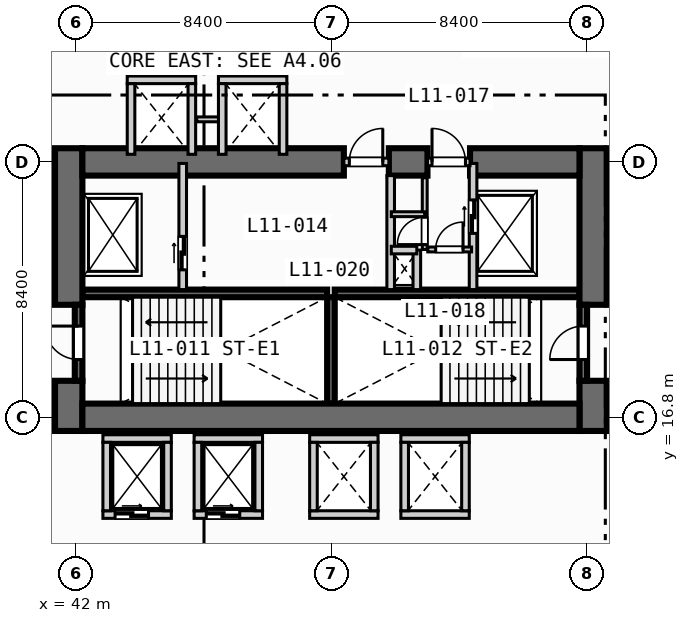
"""IFC4 building model, lengths in metres.
Left out: names, types, materials, properties, quantities, classifications, styles, units other than length and angle.
Written with IfcOpenShell. Run it as: python <this file> out.ifc"""

import sys

from ifc_helpers import new_model, si_unit, direction, frame, frame_2d, origin, place, context, subcontext, project, spatial, rectangle, extrude, element, fill, save


model = new_model("IFC4")
c1 = context("Model", 3, precision=1e-05, world=origin(), true_north=direction((0.0, 1.0)))
c2 = subcontext(c1, "Body", "Model", "MODEL_VIEW")
j1 = project(units=[si_unit("LENGTHUNIT", "METRE"), si_unit("PLANEANGLEUNIT", "RADIAN")], contexts=[c1])
p1 = place(None, origin())
s1 = spatial("IfcSite", under=j1, at=p1, CompositionType="ELEMENT")
p2 = place(p1, origin())
s2 = spatial("IfcBuilding", under=s1, at=p2, CompositionType="ELEMENT")
p3 = place(p2, frame((0.0, 0.0, 51.0)))
s3 = spatial("IfcBuildingStorey", under=s2, at=p3, CompositionType="ELEMENT", Elevation=51.0)
for number, where, z_axis, x_axis in (
    (1, (42.2, 20.875, 0.0), (0.0, 0.0, 1.0), (1.0, 0.0, 0.0)),
    (2, (50.5, 20.875, 0.0), (0.0, 0.0, 1.0), (1.0, 0.0, 0.0)),
):
    element("IfcWall", number, at=place(p3, frame(where, z_axis=z_axis, x_axis=x_axis)), inside=s3, PredefinedType="SOLIDWALL", context=c2, shape_type="SweptSolid", body=[
        extrude(rectangle(XDim=8.05, YDim=0.25, at=frame_2d((4.025, 0.0))), origin(), (0.0, 0.0, 1.0), 3.55),
    ])
p4 = place(p3, frame((50.375, 17.25, 0.0), z_axis=(0.0, 0.0, 1.0), x_axis=(0.0, 1.0, 0.0)))
e3 = element("IfcWall", 3, at=p4, inside=s3, PredefinedType="SOLIDWALL", context=c2, shape_type="SweptSolid", body=[
    extrude(rectangle(XDim=3.5, YDim=0.25, at=frame_2d((1.75, 0.0))), origin(), (0.0, 0.0, 1.0), 3.55),
])
p5 = place(p3, frame((41.75, 16.35, 0.0), z_axis=(0.0, 0.0, 1.0), x_axis=(0.0, 1.0, 0.0)))
e4 = element("IfcWall", 4, at=p5, inside=s3, PredefinedType="SHEAR", context=c2, shape_type="SweptSolid", body=[
    extrude(rectangle(XDim=1.65, YDim=0.9, at=frame_2d((0.825, 0.0))), origin(), (0.0, 0.0, 1.0), 3.55),
])
p6 = place(p3, frame((41.75, 20.5, 0.0), z_axis=(0.0, 0.0, 1.0), x_axis=(0.0, 1.0, 0.0)))
e5 = element("IfcWall", 5, at=p6, inside=s3, PredefinedType="SHEAR", context=c2, shape_type="SweptSolid", body=[
    extrude(rectangle(XDim=5.15, YDim=0.9, at=frame_2d((2.575, 0.0))), origin(), (0.0, 0.0, 1.0), 3.55),
])
p7 = place(p3, frame((59.0, 16.35, 0.0), z_axis=(0.0, 0.0, 1.0), x_axis=(0.0, 1.0, 0.0)))
e6 = element("IfcWall", 6, at=p7, inside=s3, PredefinedType="SHEAR", context=c2, shape_type="SweptSolid", body=[
    extrude(rectangle(XDim=1.65, YDim=0.9, at=frame_2d((0.825, 0.0))), origin(), (0.0, 0.0, 1.0), 3.55),
])
p8 = place(p3, frame((59.0, 20.5, 0.0), z_axis=(0.0, 0.0, 1.0), x_axis=(0.0, 1.0, 0.0)))
e7 = element("IfcWall", 7, at=p8, inside=s3, PredefinedType="SHEAR", context=c2, shape_type="SweptSolid", body=[
    extrude(rectangle(XDim=5.15, YDim=0.9, at=frame_2d((2.575, 0.0))), origin(), (0.0, 0.0, 1.0), 3.55),
])
p9 = place(p3, frame((42.2, 16.8, 0.0), z_axis=(0.0, 0.0, 1.0), x_axis=(1.0, 0.0, 0.0)))
e8 = element("IfcWall", 8, at=p9, inside=s3, PredefinedType="SHEAR", context=c2, shape_type="SweptSolid", body=[
    extrude(rectangle(XDim=16.35, YDim=0.9, at=frame_2d((8.175, 0.0))), origin(), (0.0, 0.0, 1.0), 3.55),
])
p10 = place(p3, frame((42.2, 25.2, 0.0), z_axis=(0.0, 0.0, 1.0), x_axis=(1.0, 0.0, 0.0)))
e9 = element("IfcWall", 9, at=p10, inside=s3, PredefinedType="SHEAR", context=c2, shape_type="SweptSolid", body=[
    extrude(rectangle(XDim=8.6, YDim=0.9, at=frame_2d((4.3, 0.0))), origin(), (0.0, 0.0, 1.0), 3.55),
])
p11 = place(p3, frame((52.28, 25.2, 0.0), z_axis=(0.0, 0.0, 1.0), x_axis=(1.0, 0.0, 0.0)))
e10 = element("IfcWall", 10, at=p11, inside=s3, PredefinedType="SHEAR", context=c2, shape_type="SweptSolid", body=[
    extrude(rectangle(XDim=1.27, YDim=0.9, at=frame_2d((0.635, 0.0))), origin(), (0.0, 0.0, 1.0), 3.55),
])
p12 = place(p3, frame((54.95, 25.2, 0.0), z_axis=(0.0, 0.0, 1.0), x_axis=(1.0, 0.0, 0.0)))
e11 = element("IfcWall", 11, at=p12, inside=s3, PredefinedType="SHEAR", context=c2, shape_type="SweptSolid", body=[
    extrude(rectangle(XDim=3.6, YDim=0.9, at=frame_2d((1.8, 0.0))), origin(), (0.0, 0.0, 1.0), 3.55),
])
p13 = place(p3, frame((42.075, 18.0, 0.0), z_axis=(0.0, 0.0, 1.0), x_axis=(0.0, 1.0, 0.0)))
e12 = element("IfcWall", 12, at=p13, inside=s3, PredefinedType="SOLIDWALL", context=c2, shape_type="SweptSolid", body=[
    extrude(rectangle(XDim=2.5, YDim=0.25, at=frame_2d((1.25, 0.0))), origin(), (0.0, 0.0, 1.0), 3.55),
])
p14 = place(p13, frame((0.7, 0.0, 0.0)))
e13 = element("IfcOpeningElement", 13, at=p14, cuts=e12, PredefinedType="OPENING", context=c2, shape_type="SweptSolid", body=[
    extrude(rectangle(XDim=1.1, YDim=2.15, at=frame_2d((0.55, 1.075))), frame((0.0, 0.135, 0.0), z_axis=(0.0, -1.0, 0.0), x_axis=(1.0, 0.0, 0.0)), (0.0, 0.0, 1.0), 0.27),
])
p15 = place(p3, frame((58.675, 18.0, 0.0), z_axis=(0.0, 0.0, 1.0), x_axis=(0.0, 1.0, 0.0)))
e14 = element("IfcWall", 14, at=p15, inside=s3, PredefinedType="SOLIDWALL", context=c2, shape_type="SweptSolid", body=[
    extrude(rectangle(XDim=2.5, YDim=0.25, at=frame_2d((1.25, 0.0))), origin(), (0.0, 0.0, 1.0), 3.55),
])
p16 = place(p15, frame((0.7, 0.0, 0.0)))
e15 = element("IfcOpeningElement", 15, at=p16, cuts=e14, PredefinedType="OPENING", context=c2, shape_type="SweptSolid", body=[
    extrude(rectangle(XDim=1.1, YDim=2.15, at=frame_2d((0.55, 1.075))), frame((0.0, 0.135, 0.0), z_axis=(0.0, -1.0, 0.0), x_axis=(1.0, 0.0, 0.0)), (0.0, 0.0, 1.0), 0.27),
])
p17 = place(p3, frame((45.5, 21.0, 0.0), z_axis=(0.0, 0.0, 1.0), x_axis=(0.0, 1.0, 0.0)))
e16 = element("IfcWall", 16, at=p17, inside=s3, PredefinedType="SOLIDWALL", context=c2, shape_type="SweptSolid", body=[
    extrude(rectangle(XDim=4.15, YDim=0.25, at=frame_2d((2.075, 0.0))), origin(), (0.0, 0.0, 1.0), 3.55),
])
p18 = place(p17, frame((0.65, 0.0, 0.0)))
e17 = element("IfcOpeningElement", 17, at=p18, cuts=e16, PredefinedType="OPENING", context=c2, shape_type="SweptSolid", body=[
    extrude(rectangle(XDim=1.1, YDim=2.15, at=frame_2d((0.55, 1.075))), frame((0.0, 0.135, 0.0), z_axis=(0.0, -1.0, 0.0), x_axis=(1.0, 0.0, 0.0)), (0.0, 0.0, 1.0), 0.27),
])
p19 = place(p3, frame((50.8, 25.2, 0.0), z_axis=(0.0, 0.0, 1.0), x_axis=(1.0, 0.0, 0.0)))
e18 = element("IfcWall", 18, at=p19, inside=s3, PredefinedType="SOLIDWALL", context=c2, shape_type="SweptSolid", body=[
    extrude(rectangle(XDim=1.48, YDim=0.25, at=frame_2d((0.74, 0.0))), origin(), (0.0, 0.0, 1.0), 3.55),
])
p20 = place(p19, frame((0.18, 0.0, 0.0)))
e19 = element("IfcOpeningElement", 19, at=p20, cuts=e18, PredefinedType="OPENING", context=c2, shape_type="SweptSolid", body=[
    extrude(rectangle(XDim=1.1, YDim=2.15, at=frame_2d((0.55, 1.075))), frame((0.0, 0.135, 0.0), z_axis=(0.0, -1.0, 0.0), x_axis=(1.0, 0.0, 0.0)), (0.0, 0.0, 1.0), 0.27),
])
p21 = place(p3, frame((52.34, 21.0, 0.0), z_axis=(0.0, 0.0, 1.0), x_axis=(0.0, 1.0, 0.0)))
e20 = element("IfcWall", 20, at=p21, inside=s3, PredefinedType="SOLIDWALL", context=c2, shape_type="SweptSolid", body=[
    extrude(rectangle(XDim=3.75, YDim=0.25, at=frame_2d((1.875, 0.0))), origin(), (0.0, 0.0, 1.0), 3.55),
])
p22 = place(p3, frame((55.05, 21.0, 0.0), z_axis=(0.0, 0.0, 1.0), x_axis=(0.0, 1.0, 0.0)))
e21 = element("IfcWall", 21, at=p22, inside=s3, PredefinedType="SOLIDWALL", context=c2, shape_type="SweptSolid", body=[
    extrude(rectangle(XDim=4.15, YDim=0.25, at=frame_2d((2.075, 0.0))), origin(), (0.0, 0.0, 1.0), 3.55),
])
p23 = place(p22, frame((1.85, 0.0, 0.0)))
e22 = element("IfcOpeningElement", 22, at=p23, cuts=e21, PredefinedType="OPENING", context=c2, shape_type="SweptSolid", body=[
    extrude(rectangle(XDim=1.1, YDim=2.15, at=frame_2d((0.55, 1.075))), frame((0.0, 0.135, 0.0), z_axis=(0.0, -1.0, 0.0), x_axis=(1.0, 0.0, 0.0)), (0.0, 0.0, 1.0), 0.27),
])
p24 = place(p3, frame((53.55, 25.2, 0.0), z_axis=(0.0, 0.0, 1.0), x_axis=(1.0, 0.0, 0.0)))
e23 = element("IfcWall", 23, at=p24, inside=s3, PredefinedType="SOLIDWALL", context=c2, shape_type="SweptSolid", body=[
    extrude(rectangle(XDim=1.4, YDim=0.25, at=frame_2d((0.7, 0.0))), origin(), (0.0, 0.0, 1.0), 3.55),
])
p25 = place(p24, frame((0.15, 0.0, 0.0)))
e24 = element("IfcOpeningElement", 24, at=p25, cuts=e23, PredefinedType="OPENING", context=c2, shape_type="SweptSolid", body=[
    extrude(rectangle(XDim=1.1, YDim=2.15, at=frame_2d((0.55, 1.075))), frame((0.0, 0.135, 0.0), z_axis=(0.0, -1.0, 0.0), x_axis=(1.0, 0.0, 0.0)), (0.0, 0.0, 1.0), 0.27),
])
p26 = place(p3, frame((53.2, 21.0, 0.0), z_axis=(0.0, 0.0, 1.0), x_axis=(0.0, 1.0, 0.0)))
e25 = element("IfcWall", 25, at=p26, inside=s3, PredefinedType="SOLIDWALL", context=c2, shape_type="SweptSolid", body=[
    extrude(rectangle(XDim=1.3, YDim=0.25, at=frame_2d((0.65, 0.0))), origin(), (0.0, 0.0, 1.0), 3.55),
])
p27 = place(p3, frame((52.36, 22.3, 0.0), z_axis=(0.0, 0.0, 1.0), x_axis=(1.0, 0.0, 0.0)))
e26 = element("IfcWall", 26, at=p27, inside=s3, PredefinedType="SOLIDWALL", context=c2, shape_type="SweptSolid", body=[
    extrude(rectangle(XDim=0.84, YDim=0.25, at=frame_2d((0.42, 0.0))), origin(), (0.0, 0.0, 1.0), 3.55),
])
p28 = place(p3, frame((53.56, 22.32, 0.0), z_axis=(0.0, 0.0, 1.0), x_axis=(1.0, 0.0, 0.0)))
e27 = element("IfcWall", 27, at=p28, inside=s3, PredefinedType="PARTITIONING", context=c2, shape_type="SweptSolid", body=[
    extrude(rectangle(XDim=1.44, YDim=0.16, at=frame_2d((0.72, 0.0))), origin(), (0.0, 0.0, 1.0), 3.55),
])
p29 = place(p28, frame((0.26, 0.0, 0.0)))
e28 = element("IfcOpeningElement", 28, at=p29, cuts=e27, PredefinedType="OPENING", context=c2, shape_type="SweptSolid", body=[
    extrude(rectangle(XDim=0.9, YDim=2.1, at=frame_2d((0.45, 1.05))), frame((0.0, 0.09, 0.0), z_axis=(0.0, -1.0, 0.0), x_axis=(1.0, 0.0, 0.0)), (0.0, 0.0, 1.0), 0.18),
])
p30 = place(p3, frame((53.46, 22.32, 0.0), z_axis=(0.0, 0.0, 1.0), x_axis=(0.0, 1.0, 0.0)))
e29 = element("IfcWall", 29, at=p30, inside=s3, PredefinedType="PARTITIONING", context=c2, shape_type="SweptSolid", body=[
    extrude(rectangle(XDim=2.36, YDim=0.16, at=frame_2d((1.18, 0.0))), origin(), (0.0, 0.0, 1.0), 3.55),
])
p31 = place(p30, frame((0.16, 0.0, 0.0)))
e30 = element("IfcOpeningElement", 30, at=p31, cuts=e29, PredefinedType="OPENING", context=c2, shape_type="SweptSolid", body=[
    extrude(rectangle(XDim=0.9, YDim=2.1, at=frame_2d((0.45, 1.05))), frame((0.0, 0.09, 0.0), z_axis=(0.0, -1.0, 0.0), x_axis=(1.0, 0.0, 0.0)), (0.0, 0.0, 1.0), 0.18),
])
p32 = place(p3, frame((52.36, 23.48, 0.0), z_axis=(0.0, 0.0, 1.0), x_axis=(1.0, 0.0, 0.0)))
e31 = element("IfcWall", 31, at=p32, inside=s3, PredefinedType="PARTITIONING", context=c2, shape_type="SweptSolid", body=[
    extrude(rectangle(XDim=1.1, YDim=0.16, at=frame_2d((0.55, 0.0))), origin(), (0.0, 0.0, 1.0), 3.55),
])
p33 = place(p3, frame((42.875, 13.6, 0.0), z_axis=(0.0, 0.0, 1.0), x_axis=(1.0, 0.0, 0.0)))
e32 = element("IfcWall", 32, at=p33, inside=s3, PredefinedType="SOLIDWALL", context=c2, shape_type="SweptSolid", body=[
    extrude(rectangle(XDim=2.25, YDim=0.25, at=frame_2d((1.125, 0.0))), origin(), (0.0, 0.0, 1.0), 3.55),
])
p34 = place(p33, frame((0.4, 0.0, 0.0)))
e33 = element("IfcOpeningElement", 33, at=p34, cuts=e32, PredefinedType="OPENING", context=c2, shape_type="SweptSolid", body=[
    extrude(rectangle(XDim=1.1, YDim=2.15, at=frame_2d((0.55, 1.075))), frame((0.0, 0.135, 0.0), z_axis=(0.0, -1.0, 0.0), x_axis=(1.0, 0.0, 0.0)), (0.0, 0.0, 1.0), 0.27),
])
for number, where, z_axis, x_axis in (
    (34, (42.875, 16.1, 0.0), (0.0, 0.0, 1.0), (1.0, 0.0, 0.0)),
    (35, (43.0, 13.725, 0.0), (0.0, 0.0, 1.0), (0.0, 1.0, 0.0)),
    (36, (45.0, 13.725, 0.0), (0.0, 0.0, 1.0), (0.0, 1.0, 0.0)),
):
    element("IfcWall", number, at=place(p3, frame(where, z_axis=z_axis, x_axis=x_axis)), inside=s3, PredefinedType="SOLIDWALL", context=c2, shape_type="SweptSolid", body=[
        extrude(rectangle(XDim=2.25, YDim=0.25, at=frame_2d((1.125, 0.0))), origin(), (0.0, 0.0, 1.0), 3.55),
    ])
p35 = place(p3, frame((45.875, 13.6, 0.0), z_axis=(0.0, 0.0, 1.0), x_axis=(1.0, 0.0, 0.0)))
e37 = element("IfcWall", 37, at=p35, inside=s3, PredefinedType="SOLIDWALL", context=c2, shape_type="SweptSolid", body=[
    extrude(rectangle(XDim=2.25, YDim=0.25, at=frame_2d((1.125, 0.0))), origin(), (0.0, 0.0, 1.0), 3.55),
])
p36 = place(p35, frame((0.4, 0.0, 0.0)))
e38 = element("IfcOpeningElement", 38, at=p36, cuts=e37, PredefinedType="OPENING", context=c2, shape_type="SweptSolid", body=[
    extrude(rectangle(XDim=1.1, YDim=2.15, at=frame_2d((0.55, 1.075))), frame((0.0, 0.135, 0.0), z_axis=(0.0, -1.0, 0.0), x_axis=(1.0, 0.0, 0.0)), (0.0, 0.0, 1.0), 0.27),
])
for number, where, z_axis, x_axis in (
    (39, (45.875, 16.1, 0.0), (0.0, 0.0, 1.0), (1.0, 0.0, 0.0)),
    (40, (46.0, 13.725, 0.0), (0.0, 0.0, 1.0), (0.0, 1.0, 0.0)),
    (41, (48.0, 13.725, 0.0), (0.0, 0.0, 1.0), (0.0, 1.0, 0.0)),
    (42, (49.675, 13.6, 0.0), (0.0, 0.0, 1.0), (1.0, 0.0, 0.0)),
    (43, (49.675, 16.1, 0.0), (0.0, 0.0, 1.0), (1.0, 0.0, 0.0)),
    (44, (49.8, 13.725, 0.0), (0.0, 0.0, 1.0), (0.0, 1.0, 0.0)),
    (45, (51.8, 13.725, 0.0), (0.0, 0.0, 1.0), (0.0, 1.0, 0.0)),
    (46, (52.675, 13.6, 0.0), (0.0, 0.0, 1.0), (1.0, 0.0, 0.0)),
    (47, (52.675, 16.1, 0.0), (0.0, 0.0, 1.0), (1.0, 0.0, 0.0)),
    (48, (52.8, 13.725, 0.0), (0.0, 0.0, 1.0), (0.0, 1.0, 0.0)),
    (49, (54.8, 13.725, 0.0), (0.0, 0.0, 1.0), (0.0, 1.0, 0.0)),
    (50, (43.675, 27.9, 0.0), (0.0, 0.0, 1.0), (1.0, 0.0, 0.0)),
):
    element("IfcWall", number, at=place(p3, frame(where, z_axis=z_axis, x_axis=x_axis)), inside=s3, PredefinedType="SOLIDWALL", context=c2, shape_type="SweptSolid", body=[
        extrude(rectangle(XDim=2.25, YDim=0.25, at=frame_2d((1.125, 0.0))), origin(), (0.0, 0.0, 1.0), 3.55),
    ])
for number, where, z_axis, x_axis in (
    (51, (43.8, 25.45, 0.0), (0.0, 0.0, 1.0), (0.0, 1.0, 0.0)),
    (52, (45.8, 25.45, 0.0), (0.0, 0.0, 1.0), (0.0, 1.0, 0.0)),
):
    element("IfcWall", number, at=place(p3, frame(where, z_axis=z_axis, x_axis=x_axis)), inside=s3, PredefinedType="SOLIDWALL", context=c2, shape_type="SweptSolid", body=[
        extrude(rectangle(XDim=2.325, YDim=0.25, at=frame_2d((1.163, 0.0))), origin(), (0.0, 0.0, 1.0), 3.55),
    ])
p37 = place(p3, frame((45.96, 26.6, 0.0), z_axis=(0.0, 0.0, 1.0), x_axis=(1.0, 0.0, 0.0)))
e53 = element("IfcWall", 53, at=p37, inside=s3, PredefinedType="PARTITIONING", context=c2, shape_type="SweptSolid", body=[
    extrude(rectangle(XDim=0.88, YDim=0.16, at=frame_2d((0.44, 0.0))), origin(), (0.0, 0.0, 1.0), 3.55),
])
p38 = place(p3, frame((46.675, 27.9, 0.0), z_axis=(0.0, 0.0, 1.0), x_axis=(1.0, 0.0, 0.0)))
e54 = element("IfcWall", 54, at=p38, inside=s3, PredefinedType="SOLIDWALL", context=c2, shape_type="SweptSolid", body=[
    extrude(rectangle(XDim=2.25, YDim=0.25, at=frame_2d((1.125, 0.0))), origin(), (0.0, 0.0, 1.0), 3.55),
])
for number, where, z_axis, x_axis in (
    (55, (46.8, 25.45, 0.0), (0.0, 0.0, 1.0), (0.0, 1.0, 0.0)),
    (56, (48.8, 25.45, 0.0), (0.0, 0.0, 1.0), (0.0, 1.0, 0.0)),
):
    element("IfcWall", number, at=place(p3, frame(where, z_axis=z_axis, x_axis=x_axis)), inside=s3, PredefinedType="SOLIDWALL", context=c2, shape_type="SweptSolid", body=[
        extrude(rectangle(XDim=2.325, YDim=0.25, at=frame_2d((1.163, 0.0))), origin(), (0.0, 0.0, 1.0), 3.55),
    ])
p39 = place(p14, origin())
e57 = element("IfcDoor", 57, at=p39, inside=s3, OperationType="SINGLE_SWING_RIGHT", PredefinedType="DOOR", context=c2, shape_type="SweptSolid", body=[
    extrude(rectangle(XDim=1.1, YDim=2.15, at=frame_2d((0.55, 1.075))), frame((0.0, 0.025, 0.0), z_axis=(0.0, -1.0, 0.0), x_axis=(1.0, 0.0, 0.0)), (0.0, 0.0, 1.0), 0.05),
])
fill(e13, e57)
p40 = place(p16, origin())
e58 = element("IfcDoor", 58, at=p40, inside=s3, OperationType="SINGLE_SWING_LEFT", PredefinedType="DOOR", context=c2, shape_type="SweptSolid", body=[
    extrude(rectangle(XDim=1.1, YDim=2.15, at=frame_2d((0.55, 1.075))), frame((0.0, 0.025, 0.0), z_axis=(0.0, -1.0, 0.0), x_axis=(1.0, 0.0, 0.0)), (0.0, 0.0, 1.0), 0.05),
])
fill(e15, e58)
p41 = place(p18, origin())
e59 = element("IfcDoor", 59, at=p41, inside=s3, OperationType="SLIDING_TO_LEFT", PredefinedType="DOOR", context=c2, shape_type="SweptSolid", body=[
    extrude(rectangle(XDim=1.1, YDim=2.15, at=frame_2d((0.55, 1.075))), frame((0.0, 0.025, 0.0), z_axis=(0.0, -1.0, 0.0), x_axis=(1.0, 0.0, 0.0)), (0.0, 0.0, 1.0), 0.05),
])
fill(e17, e59)
p42 = place(p20, origin())
e60 = element("IfcDoor", 60, at=p42, inside=s3, OperationType="SINGLE_SWING_RIGHT", PredefinedType="DOOR", context=c2, shape_type="SweptSolid", body=[
    extrude(rectangle(XDim=1.1, YDim=2.15, at=frame_2d((0.55, 1.075))), frame((0.0, 0.025, 0.0), z_axis=(0.0, -1.0, 0.0), x_axis=(1.0, 0.0, 0.0)), (0.0, 0.0, 1.0), 0.05),
])
fill(e19, e60)
p43 = place(p23, origin())
e61 = element("IfcDoor", 61, at=p43, inside=s3, OperationType="SLIDING_TO_LEFT", PredefinedType="DOOR", context=c2, shape_type="SweptSolid", body=[
    extrude(rectangle(XDim=1.1, YDim=2.15, at=frame_2d((0.55, 1.075))), frame((0.0, 0.025, 0.0), z_axis=(0.0, -1.0, 0.0), x_axis=(1.0, 0.0, 0.0)), (0.0, 0.0, 1.0), 0.05),
])
fill(e22, e61)
p44 = place(p25, origin())
e62 = element("IfcDoor", 62, at=p44, inside=s3, OperationType="SINGLE_SWING_LEFT", PredefinedType="DOOR", context=c2, shape_type="SweptSolid", body=[
    extrude(rectangle(XDim=1.1, YDim=2.15, at=frame_2d((0.55, 1.075))), frame((0.0, 0.025, 0.0), z_axis=(0.0, -1.0, 0.0), x_axis=(1.0, 0.0, 0.0)), (0.0, 0.0, 1.0), 0.05),
])
fill(e24, e62)
p45 = place(p29, origin())
e63 = element("IfcDoor", 63, at=p45, inside=s3, OperationType="SINGLE_SWING_RIGHT", PredefinedType="DOOR", context=c2, shape_type="SweptSolid", body=[
    extrude(rectangle(XDim=0.9, YDim=2.1, at=frame_2d((0.45, 1.05))), frame((0.0, 0.025, 0.0), z_axis=(0.0, -1.0, 0.0), x_axis=(1.0, 0.0, 0.0)), (0.0, 0.0, 1.0), 0.05),
])
fill(e28, e63)
p46 = place(p31, origin())
e64 = element("IfcDoor", 64, at=p46, inside=s3, OperationType="SINGLE_SWING_LEFT", PredefinedType="DOOR", context=c2, shape_type="SweptSolid", body=[
    extrude(rectangle(XDim=0.9, YDim=2.1, at=frame_2d((0.45, 1.05))), frame((0.0, 0.025, 0.0), z_axis=(0.0, -1.0, 0.0), x_axis=(1.0, 0.0, 0.0)), (0.0, 0.0, 1.0), 0.05),
])
fill(e30, e64)
p47 = place(p34, origin())
e65 = element("IfcDoor", 65, at=p47, inside=s3, OperationType="SLIDING_TO_LEFT", PredefinedType="DOOR", context=c2, shape_type="SweptSolid", body=[
    extrude(rectangle(XDim=1.1, YDim=2.15, at=frame_2d((0.55, 1.075))), frame((0.0, 0.025, 0.0), z_axis=(0.0, -1.0, 0.0), x_axis=(1.0, 0.0, 0.0)), (0.0, 0.0, 1.0), 0.05),
])
fill(e33, e65)
p48 = place(p36, origin())
e66 = element("IfcDoor", 66, at=p48, inside=s3, OperationType="SLIDING_TO_LEFT", PredefinedType="DOOR", context=c2, shape_type="SweptSolid", body=[
    extrude(rectangle(XDim=1.1, YDim=2.15, at=frame_2d((0.55, 1.075))), frame((0.0, 0.025, 0.0), z_axis=(0.0, -1.0, 0.0), x_axis=(1.0, 0.0, 0.0)), (0.0, 0.0, 1.0), 0.05),
])
fill(e38, e66)
save(model, sys.argv[1])
